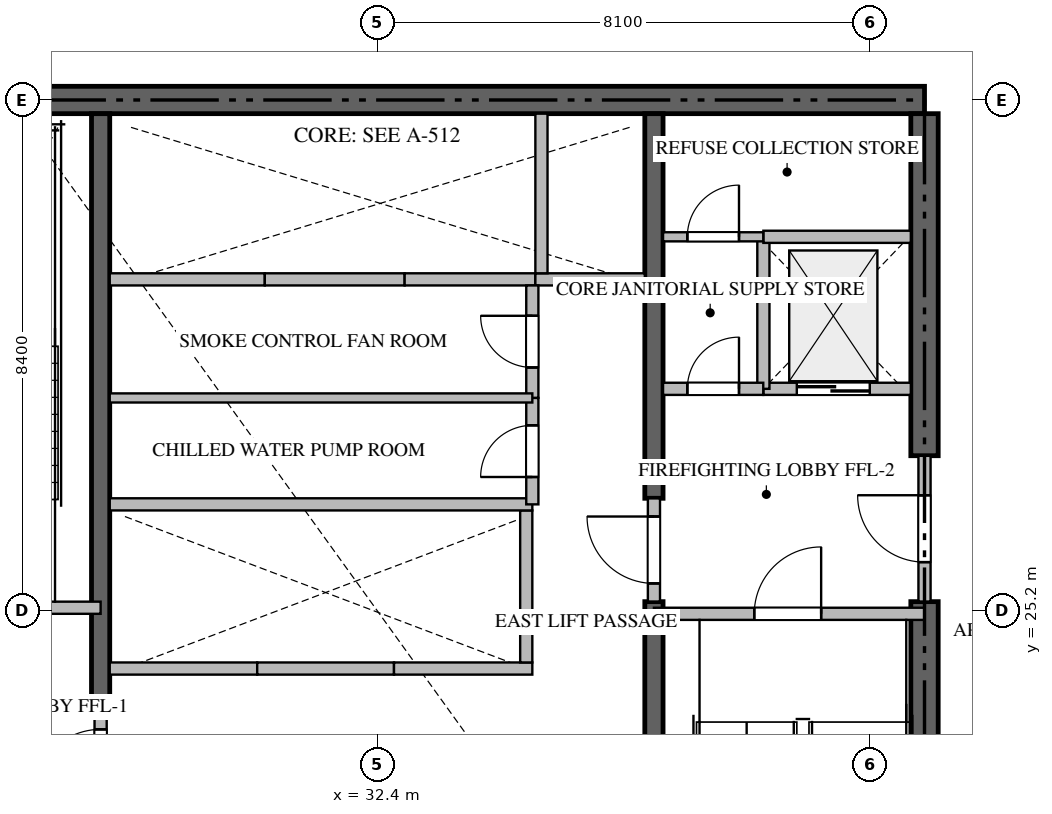
"""IFC4 building model, lengths in metres.
Left out: names, types, materials, properties, quantities, classifications, styles, units other than length and angle.
Written with IfcOpenShell. Run it as: python <this file> out.ifc"""

import sys

from ifc_helpers import new_model, si_unit, direction, frame, frame_2d, origin, place, context, subcontext, project, spatial, rectangle, extrude, source, transform, mapped, element, fill, save


model = new_model("IFC4")
c1 = context("Model", 3, precision=1e-05, world=origin(), true_north=direction((0.0, 1.0)))
c2 = subcontext(c1, "Body", "Model", "MODEL_VIEW")
j1 = project(units=[si_unit("LENGTHUNIT", "METRE"), si_unit("PLANEANGLEUNIT", "RADIAN")], contexts=[c1])
p1 = place(None, origin())
s1 = spatial("IfcSite", under=j1, at=p1, CompositionType="ELEMENT")
p2 = place(p1, origin())
s2 = spatial("IfcBuilding", under=s1, at=p2, CompositionType="ELEMENT")
p3 = place(p2, frame((0.0, 0.0, 56.7)))
s3 = spatial("IfcBuildingStorey", under=s2, at=p3, CompositionType="ELEMENT", Elevation=56.7)
p4 = place(p3, frame((41.4, 33.6, -0.26), z_axis=(0.0, 0.0, 1.0), x_axis=(-1.0, 0.0, 0.0)))
e1 = element("IfcWall", 1, at=p4, inside=s3, PredefinedType="SHEAR", context=c2, shape_type="SweptSolid", body=[
    extrude(rectangle(XDim=18.0, YDim=0.45, at=frame_2d((9.0, 0.0))), origin(), (0.0, 0.0, 1.0), 3.748),
])
p5 = place(p3, frame((41.4, 17.025, -0.26), z_axis=(0.0, 0.0, 1.0), x_axis=(0.0, 1.0, 0.0)))
e2 = element("IfcWall", 2, at=p5, inside=s3, PredefinedType="SHEAR", context=c2, shape_type="SweptSolid", body=[
    extrude(rectangle(XDim=8.325, YDim=0.45, at=frame_2d((4.163, 0.0))), origin(), (0.0, 0.0, 1.0), 3.748),
])
p6 = place(p3, frame((41.4, 27.75, -0.26), z_axis=(0.0, 0.0, 1.0), x_axis=(0.0, 1.0, 0.0)))
e3 = element("IfcWall", 3, at=p6, inside=s3, PredefinedType="SHEAR", context=c2, shape_type="SweptSolid", body=[
    extrude(rectangle(XDim=5.625, YDim=0.45, at=frame_2d((2.812, 0.0))), origin(), (0.0, 0.0, 1.0), 3.748),
])
p7 = place(p3, frame((27.85, 23.55, -0.26), z_axis=(0.0, 0.0, 1.0), x_axis=(0.0, 1.0, 0.0)))
e4 = element("IfcWall", 4, at=p7, inside=s3, PredefinedType="SHEAR", context=c2, shape_type="SweptSolid", body=[
    extrude(rectangle(XDim=9.825, YDim=0.3, at=frame_2d((4.913, 0.0))), origin(), (0.0, 0.0, 1.0), 3.748),
])
p8 = place(p3, frame((36.95, 17.025, -0.26), z_axis=(0.0, 0.0, 1.0), x_axis=(0.0, 1.0, 0.0)))
e5 = element("IfcWall", 5, at=p8, inside=s3, PredefinedType="SHEAR", context=c2, shape_type="SweptSolid", body=[
    extrude(rectangle(XDim=8.325, YDim=0.3, at=frame_2d((4.163, 0.0))), origin(), (0.0, 0.0, 1.0), 3.748),
])
p9 = place(p3, frame((36.95, 27.05, -0.26), z_axis=(0.0, 0.0, 1.0), x_axis=(0.0, 1.0, 0.0)))
e6 = element("IfcWall", 6, at=p9, inside=s3, PredefinedType="SHEAR", context=c2, shape_type="SweptSolid", body=[
    extrude(rectangle(XDim=6.325, YDim=0.3, at=frame_2d((3.163, 0.0))), origin(), (0.0, 0.0, 1.0), 3.748),
])
p10 = place(p3, frame((23.4, 25.25, 0.0), z_axis=(0.0, 0.0, 1.0), x_axis=(1.0, 0.0, 0.0)))
e7 = element("IfcWall", 7, at=p10, inside=s3, PredefinedType="STANDARD", context=c2, shape_type="SweptSolid", body=[
    extrude(rectangle(XDim=4.45, YDim=0.2, at=frame_2d((2.225, 0.0))), origin(), (0.0, 0.0, 1.0), 3.49),
])
p11 = place(p10, frame((1.65, 0.0, 0.0)))
e8 = element("IfcOpeningElement", 8, at=p11, cuts=e7, PredefinedType="OPENING", context=c2, shape_type="SweptSolid", body=[
    extrude(rectangle(XDim=1.1, YDim=2.15, at=frame_2d((0.55, 1.075))), frame((0.0, 0.11, 0.0), z_axis=(0.0, -1.0, 0.0), x_axis=(1.0, 0.0, 0.0)), (0.0, 0.0, 1.0), 0.22),
])
p12 = place(p3, frame((36.95, 25.15, 0.0), z_axis=(0.0, 0.0, 1.0), x_axis=(1.0, 0.0, 0.0)))
e9 = element("IfcWall", 9, at=p12, inside=s3, PredefinedType="STANDARD", context=c2, shape_type="SweptSolid", body=[
    extrude(rectangle(XDim=4.45, YDim=0.2, at=frame_2d((2.225, 0.0))), origin(), (0.0, 0.0, 1.0), 3.49),
])
p13 = place(p12, frame((1.65, 0.0, 0.0)))
e10 = element("IfcOpeningElement", 10, at=p13, cuts=e9, PredefinedType="OPENING", context=c2, shape_type="SweptSolid", body=[
    extrude(rectangle(XDim=1.1, YDim=2.15, at=frame_2d((0.55, 1.075))), frame((0.0, 0.11, 0.0), z_axis=(0.0, -1.0, 0.0), x_axis=(1.0, 0.0, 0.0)), (0.0, 0.0, 1.0), 0.22),
])
p14 = place(p3, frame((38.75, 28.85, 0.0), z_axis=(0.0, 0.0, 1.0), x_axis=(1.0, 0.0, 0.0)))
e11 = element("IfcWall", 11, at=p14, inside=s3, PredefinedType="STANDARD", context=c2, shape_type="SweptSolid", body=[
    extrude(rectangle(XDim=2.425, YDim=0.2, at=frame_2d((1.212, 0.0))), origin(), (0.0, 0.0, 1.0), 3.49),
])
p15 = place(p14, frame((0.55, 0.0, 0.0)))
e12 = element("IfcOpeningElement", 12, at=p15, cuts=e11, PredefinedType="OPENING", context=c2, shape_type="SweptSolid", body=[
    extrude(rectangle(XDim=1.2, YDim=2.2, at=frame_2d((0.6, 1.1))), frame((0.0, 0.11, 0.0), z_axis=(0.0, -1.0, 0.0), x_axis=(1.0, 0.0, 0.0)), (0.0, 0.0, 1.0), 0.22),
])
p16 = place(p3, frame((28.0, 24.25, 0.0), z_axis=(0.0, 0.0, 1.0), x_axis=(1.0, 0.0, 0.0)))
e13 = element("IfcWall", 13, at=p16, inside=s3, PredefinedType="STANDARD", context=c2, shape_type="SweptSolid", body=[
    extrude(rectangle(XDim=2.425, YDim=0.2, at=frame_2d((1.212, 0.0))), origin(), (0.0, 0.0, 1.0), 3.49),
])
p17 = place(p3, frame((30.425, 24.25, 0.0), z_axis=(0.0, 0.0, 1.0), x_axis=(1.0, 0.0, 0.0)))
e14 = element("IfcWall", 14, at=p17, inside=s3, PredefinedType="STANDARD", context=c2, shape_type="SweptSolid", body=[
    extrude(rectangle(XDim=2.25, YDim=0.2, at=frame_2d((1.125, 0.0))), origin(), (0.0, 0.0, 1.0), 3.49),
])
p18 = place(p3, frame((32.675, 24.25, 0.0), z_axis=(0.0, 0.0, 1.0), x_axis=(1.0, 0.0, 0.0)))
e15 = element("IfcWall", 15, at=p18, inside=s3, PredefinedType="STANDARD", context=c2, shape_type="SweptSolid", body=[
    extrude(rectangle(XDim=2.275, YDim=0.2, at=frame_2d((1.137, 0.0))), origin(), (0.0, 0.0, 1.0), 3.49),
])
p19 = place(p3, frame((34.85, 24.35, 0.0), z_axis=(0.0, 0.0, 1.0), x_axis=(0.0, 1.0, 0.0)))
e16 = element("IfcWall", 16, at=p19, inside=s3, PredefinedType="STANDARD", context=c2, shape_type="SweptSolid", body=[
    extrude(rectangle(XDim=2.5, YDim=0.2, at=frame_2d((1.25, 0.0))), origin(), (0.0, 0.0, 1.0), 3.49),
])
p20 = place(p3, frame((28.0, 30.65, 0.0), z_axis=(0.0, 0.0, 1.0), x_axis=(1.0, 0.0, 0.0)))
e17 = element("IfcWall", 17, at=p20, inside=s3, PredefinedType="STANDARD", context=c2, shape_type="SweptSolid", body=[
    extrude(rectangle(XDim=2.55, YDim=0.2, at=frame_2d((1.275, 0.0))), origin(), (0.0, 0.0, 1.0), 3.49),
])
p21 = place(p3, frame((30.55, 30.65, 0.0), z_axis=(0.0, 0.0, 1.0), x_axis=(1.0, 0.0, 0.0)))
e18 = element("IfcWall", 18, at=p21, inside=s3, PredefinedType="STANDARD", context=c2, shape_type="SweptSolid", body=[
    extrude(rectangle(XDim=2.3, YDim=0.2, at=frame_2d((1.15, 0.0))), origin(), (0.0, 0.0, 1.0), 3.49),
])
p22 = place(p3, frame((32.85, 30.65, 0.0), z_axis=(0.0, 0.0, 1.0), x_axis=(1.0, 0.0, 0.0)))
e19 = element("IfcWall", 19, at=p22, inside=s3, PredefinedType="STANDARD", context=c2, shape_type="SweptSolid", body=[
    extrude(rectangle(XDim=2.15, YDim=0.2, at=frame_2d((1.075, 0.0))), origin(), (0.0, 0.0, 1.0), 3.49),
])
p23 = place(p3, frame((35.0, 30.65, 0.0), z_axis=(0.0, 0.0, 1.0), x_axis=(1.0, 0.0, 0.0)))
e20 = element("IfcWall", 20, at=p23, inside=s3, PredefinedType="STANDARD", context=c2, shape_type="SweptSolid", body=[
    extrude(rectangle(XDim=1.8, YDim=0.2, at=frame_2d((0.9, 0.0))), origin(), (0.0, 0.0, 1.0), 3.49),
])
p24 = place(p3, frame((35.1, 30.75, 0.0), z_axis=(0.0, 0.0, 1.0), x_axis=(0.0, 1.0, 0.0)))
e21 = element("IfcWall", 21, at=p24, inside=s3, PredefinedType="STANDARD", context=c2, shape_type="SweptSolid", body=[
    extrude(rectangle(XDim=2.625, YDim=0.2, at=frame_2d((1.312, 0.0))), origin(), (0.0, 0.0, 1.0), 3.49),
])
p25 = place(p3, frame((38.75, 28.85, 0.0), z_axis=(0.0, 0.0, 1.0), x_axis=(0.0, 1.0, 0.0)))
e22 = element("IfcWall", 22, at=p25, inside=s3, PredefinedType="STANDARD", context=c2, shape_type="SweptSolid", body=[
    extrude(rectangle(XDim=2.5, YDim=0.2, at=frame_2d((1.25, 0.0))), origin(), (0.0, 0.0, 1.0), 3.49),
])
p26 = place(p3, frame((38.75, 31.35, 0.0), z_axis=(0.0, 0.0, 1.0), x_axis=(1.0, 0.0, 0.0)))
e23 = element("IfcWall", 23, at=p26, inside=s3, PredefinedType="STANDARD", context=c2, shape_type="SweptSolid", body=[
    extrude(rectangle(XDim=2.425, YDim=0.2, at=frame_2d((1.212, 0.0))), origin(), (0.0, 0.0, 1.0), 3.49),
])
p27 = place(p3, frame((37.1, 28.85, 0.0), z_axis=(0.0, 0.0, 1.0), x_axis=(1.0, 0.0, 0.0)))
e24 = element("IfcWall", 24, at=p27, inside=s3, PredefinedType="STANDARD", context=c2, shape_type="SweptSolid", body=[
    extrude(rectangle(XDim=1.648, YDim=0.2, at=frame_2d((0.824, 0.0))), origin(), (0.0, 0.0, 1.0), 3.49),
])
p28 = place(p27, frame((0.399, 0.0, 0.0)))
e25 = element("IfcOpeningElement", 25, at=p28, cuts=e24, PredefinedType="OPENING", context=c2, shape_type="SweptSolid", body=[
    extrude(rectangle(XDim=0.85, YDim=2.1, at=frame_2d((0.425, 1.05))), frame((0.0, 0.11, 0.0), z_axis=(0.0, -1.0, 0.0), x_axis=(1.0, 0.0, 0.0)), (0.0, 0.0, 1.0), 0.22),
])
p29 = place(p3, frame((41.4, 25.352, 0.0), z_axis=(0.0, 0.0, 1.0), x_axis=(0.0, 1.0, 0.0)))
e26 = element("IfcWall", 26, at=p29, inside=s3, PredefinedType="STANDARD", context=c2, shape_type="SweptSolid", body=[
    extrude(rectangle(XDim=2.396, YDim=0.2, at=frame_2d((1.198, 0.0))), origin(), (0.0, 0.0, 1.0), 3.49),
])
p30 = place(p29, frame((0.648, 0.0, 0.0)))
e27 = element("IfcOpeningElement", 27, at=p30, cuts=e26, PredefinedType="OPENING", context=c2, shape_type="SweptSolid", body=[
    extrude(rectangle(XDim=1.1, YDim=2.15, at=frame_2d((0.55, 1.075))), frame((0.0, 0.11, 0.0), z_axis=(0.0, -1.0, 0.0), x_axis=(1.0, 0.0, 0.0)), (0.0, 0.0, 1.0), 0.22),
])
p31 = place(p3, frame((27.85, 21.852, 0.0), z_axis=(0.0, 0.0, 1.0), x_axis=(0.0, 1.0, 0.0)))
e28 = element("IfcWall", 28, at=p31, inside=s3, PredefinedType="STANDARD", context=c2, shape_type="SweptSolid", body=[
    extrude(rectangle(XDim=1.696, YDim=0.2, at=frame_2d((0.848, 0.0))), origin(), (0.0, 0.0, 1.0), 3.49),
])
p32 = place(p31, frame((0.298, 0.0, 0.0)))
e29 = element("IfcOpeningElement", 29, at=p32, cuts=e28, PredefinedType="OPENING", context=c2, shape_type="SweptSolid", body=[
    extrude(rectangle(XDim=1.1, YDim=2.15, at=frame_2d((0.55, 1.075))), frame((0.0, 0.11, 0.0), z_axis=(0.0, -1.0, 0.0), x_axis=(1.0, 0.0, 0.0)), (0.0, 0.0, 1.0), 0.22),
])
p33 = place(p3, frame((36.95, 25.352, 0.0), z_axis=(0.0, 0.0, 1.0), x_axis=(0.0, 1.0, 0.0)))
e30 = element("IfcWall", 30, at=p33, inside=s3, PredefinedType="STANDARD", context=c2, shape_type="SweptSolid", body=[
    extrude(rectangle(XDim=1.696, YDim=0.2, at=frame_2d((0.848, 0.0))), origin(), (0.0, 0.0, 1.0), 3.49),
])
p34 = place(p33, frame((0.298, 0.0, 0.0)))
e31 = element("IfcOpeningElement", 31, at=p34, cuts=e30, PredefinedType="OPENING", context=c2, shape_type="SweptSolid", body=[
    extrude(rectangle(XDim=1.1, YDim=2.15, at=frame_2d((0.55, 1.075))), frame((0.0, 0.11, 0.0), z_axis=(0.0, -1.0, 0.0), x_axis=(1.0, 0.0, 0.0)), (0.0, 0.0, 1.0), 0.22),
])
p35 = place(p3, frame((28.0, 26.95, 0.0), z_axis=(0.0, 0.0, 1.0), x_axis=(1.0, 0.0, 0.0)))
e32 = element("IfcWall", 32, at=p35, inside=s3, PredefinedType="STANDARD", context=c2, shape_type="SweptSolid", body=[
    extrude(rectangle(XDim=6.95, YDim=0.2, at=frame_2d((3.475, 0.0))), origin(), (0.0, 0.0, 1.0), 3.49),
])
p36 = place(p3, frame((37.1, 31.35, 0.0), z_axis=(0.0, 0.0, 1.0), x_axis=(1.0, 0.0, 0.0)))
e33 = element("IfcWall", 33, at=p36, inside=s3, PredefinedType="PARTITIONING", context=c2, shape_type="SweptSolid", body=[
    extrude(rectangle(XDim=1.648, YDim=0.15, at=frame_2d((0.824, 0.0))), origin(), (0.0, 0.0, 1.0), 3.49),
])
p37 = place(p36, frame((0.399, 0.0, 0.0)))
e34 = element("IfcOpeningElement", 34, at=p37, cuts=e33, PredefinedType="OPENING", context=c2, shape_type="SweptSolid", body=[
    extrude(rectangle(XDim=0.85, YDim=2.1, at=frame_2d((0.425, 1.05))), frame((0.0, 0.085, 0.0), z_axis=(0.0, -1.0, 0.0), x_axis=(1.0, 0.0, 0.0)), (0.0, 0.0, 1.0), 0.17),
])
p38 = place(p3, frame((34.95, 26.95, 0.0), z_axis=(0.0, 0.0, 1.0), x_axis=(0.0, 1.0, 0.0)))
e35 = element("IfcWall", 35, at=p38, inside=s3, PredefinedType="STANDARD", context=c2, shape_type="SweptSolid", body=[
    extrude(rectangle(XDim=1.75, YDim=0.2, at=frame_2d((0.875, 0.0))), origin(), (0.0, 0.0, 1.0), 3.49),
])
p39 = place(p38, frame((0.45, 0.0, 0.0)))
e36 = element("IfcOpeningElement", 36, at=p39, cuts=e35, PredefinedType="OPENING", context=c2, shape_type="SweptSolid", body=[
    extrude(rectangle(XDim=0.85, YDim=2.1, at=frame_2d((0.425, 1.05))), frame((0.0, 0.11, 0.0), z_axis=(0.0, -1.0, 0.0), x_axis=(1.0, 0.0, 0.0)), (0.0, 0.0, 1.0), 0.22),
])
p40 = place(p3, frame((34.95, 28.702, 0.0), z_axis=(0.0, 0.0, 1.0), x_axis=(0.0, 1.0, 0.0)))
e37 = element("IfcWall", 37, at=p40, inside=s3, PredefinedType="STANDARD", context=c2, shape_type="SweptSolid", body=[
    extrude(rectangle(XDim=1.848, YDim=0.2, at=frame_2d((0.924, 0.0))), origin(), (0.0, 0.0, 1.0), 3.49),
])
p41 = place(p40, frame((0.499, 0.0, 0.0)))
e38 = element("IfcOpeningElement", 38, at=p41, cuts=e37, PredefinedType="OPENING", context=c2, shape_type="SweptSolid", body=[
    extrude(rectangle(XDim=0.85, YDim=2.1, at=frame_2d((0.425, 1.05))), frame((0.0, 0.11, 0.0), z_axis=(0.0, -1.0, 0.0), x_axis=(1.0, 0.0, 0.0)), (0.0, 0.0, 1.0), 0.22),
])
p42 = place(p3, frame((28.0, 28.7, 0.0), z_axis=(0.0, 0.0, 1.0), x_axis=(1.0, 0.0, 0.0)))
e39 = element("IfcWall", 39, at=p42, inside=s3, PredefinedType="PARTITIONING", context=c2, shape_type="SweptSolid", body=[
    extrude(rectangle(XDim=6.95, YDim=0.15, at=frame_2d((3.475, 0.0))), origin(), (0.0, 0.0, 1.0), 3.49),
])
m1 = source(origin(), c2, "Body", "SweptSolid", [
    extrude(rectangle(XDim=1.1, YDim=2.15, at=frame_2d((0.55, 1.075))), frame((0.0, 0.025, 0.0), z_axis=(0.0, -1.0, 0.0), x_axis=(1.0, 0.0, 0.0)), (0.0, 0.0, 1.0), 0.05),
])
p43 = place(p13, origin())
e40 = element("IfcDoor", 40, at=p43, inside=s3, OperationType="SINGLE_SWING_RIGHT", PredefinedType="DOOR", context=c2, shape_type="MappedRepresentation", body=[
    mapped(m1, transform((0.0, 0.0, 0.0), scale=1.0)),
])
fill(e10, e40)
m2 = source(origin(), c2, "Body", "SweptSolid", [
    extrude(rectangle(XDim=1.2, YDim=2.2, at=frame_2d((0.6, 1.1))), frame((0.0, 0.025, 0.0), z_axis=(0.0, -1.0, 0.0), x_axis=(1.0, 0.0, 0.0)), (0.0, 0.0, 1.0), 0.05),
])
p44 = place(p15, origin())
e41 = element("IfcDoor", 41, at=p44, inside=s3, OperationType="DOUBLE_DOOR_SLIDING", PredefinedType="DOOR", context=c2, shape_type="MappedRepresentation", body=[
    mapped(m2, transform((0.0, 0.0, 0.0), scale=1.0)),
])
fill(e12, e41)
m3 = source(origin(), c2, "Body", "SweptSolid", [
    extrude(rectangle(XDim=0.85, YDim=2.1, at=frame_2d((0.425, 1.05))), frame((0.0, 0.025, 0.0), z_axis=(0.0, -1.0, 0.0), x_axis=(1.0, 0.0, 0.0)), (0.0, 0.0, 1.0), 0.05),
])
p45 = place(p28, origin())
e42 = element("IfcDoor", 42, at=p45, inside=s3, OperationType="SINGLE_SWING_RIGHT", PredefinedType="DOOR", context=c2, shape_type="MappedRepresentation", body=[
    mapped(m3, transform((0.0, 0.0, 0.0), scale=1.0)),
])
fill(e25, e42)
p46 = place(p30, origin())
e43 = element("IfcDoor", 43, at=p46, inside=s3, OperationType="SINGLE_SWING_RIGHT", PredefinedType="DOOR", context=c2, shape_type="MappedRepresentation", body=[
    mapped(m1, transform((0.0, 0.0, 0.0), scale=1.0)),
])
fill(e27, e43)
p47 = place(p32, origin())
e44 = element("IfcDoor", 44, at=p47, inside=s3, OperationType="SINGLE_SWING_LEFT", PredefinedType="DOOR", context=c2, shape_type="MappedRepresentation", body=[
    mapped(m1, transform((0.0, 0.0, 0.0), scale=1.0)),
])
fill(e29, e44)
p48 = place(p34, origin())
e45 = element("IfcDoor", 45, at=p48, inside=s3, OperationType="SINGLE_SWING_RIGHT", PredefinedType="DOOR", context=c2, shape_type="MappedRepresentation", body=[
    mapped(m1, transform((0.0, 0.0, 0.0), scale=1.0)),
])
fill(e31, e45)
p49 = place(p37, origin())
e46 = element("IfcDoor", 46, at=p49, inside=s3, OperationType="SINGLE_SWING_RIGHT", PredefinedType="DOOR", context=c2, shape_type="MappedRepresentation", body=[
    mapped(m3, transform((0.0, 0.0, 0.0), scale=1.0)),
])
fill(e34, e46)
p50 = place(p39, origin())
e47 = element("IfcDoor", 47, at=p50, inside=s3, OperationType="SINGLE_SWING_LEFT", PredefinedType="DOOR", context=c2, shape_type="MappedRepresentation", body=[
    mapped(m3, transform((0.0, 0.0, 0.0), scale=1.0)),
])
fill(e36, e47)
p51 = place(p41, origin())
e48 = element("IfcDoor", 48, at=p51, inside=s3, OperationType="SINGLE_SWING_RIGHT", PredefinedType="DOOR", context=c2, shape_type="MappedRepresentation", body=[
    mapped(m3, transform((0.0, 0.0, 0.0), scale=1.0)),
])
fill(e38, e48)
save(model, sys.argv[1])
